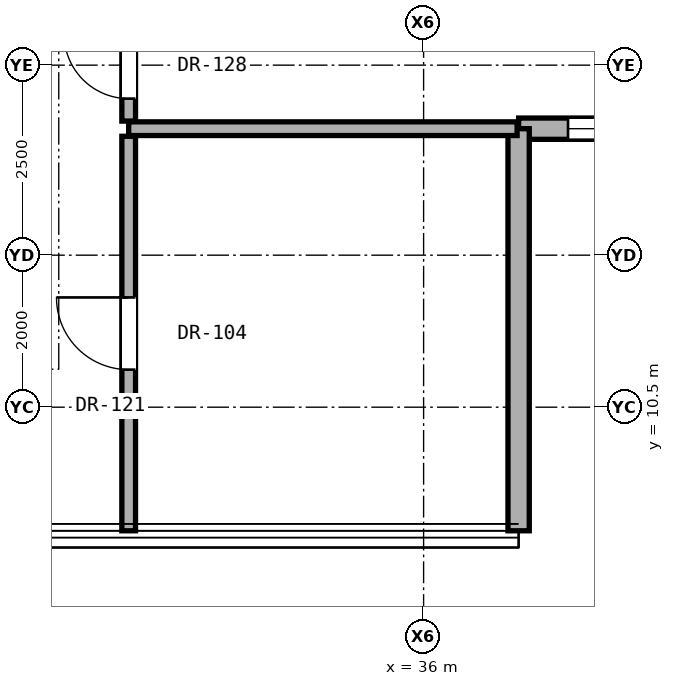
"""IFC4 building model, lengths in metres.
Left out: names, types, materials, properties, quantities, classifications, styles, units other than length and angle.
Written with IfcOpenShell. Run it as: python <this file> out.ifc"""

import sys

from ifc_helpers import new_model, si_unit, direction, frame, frame_2d, origin, place, context, subcontext, project, spatial, rectangle, extrude, element, fill, save


model = new_model("IFC4")
c1 = context("Model", 3, precision=1e-05, world=origin(), true_north=direction((0.0, 1.0)))
c2 = subcontext(c1, "Body", "Model", "MODEL_VIEW")
j1 = project(units=[si_unit("LENGTHUNIT", "METRE"), si_unit("PLANEANGLEUNIT", "RADIAN")], contexts=[c1])
p1 = place(None, origin())
s1 = spatial("IfcSite", under=j1, at=p1, CompositionType="ELEMENT")
p2 = place(p1, origin())
s2 = spatial("IfcBuilding", under=s1, at=p2, CompositionType="ELEMENT")
p3 = place(p2, frame((0.0, 0.0, 242.5)))
s3 = spatial("IfcBuildingStorey", under=s2, at=p3, CompositionType="ELEMENT", Elevation=242.5)
p4 = place(p3, frame((37.25, 14.164, 0.0), z_axis=(0.0, 0.0, 1.0), x_axis=(1.0, 0.0, 0.0)))
e1 = element("IfcWall", 1, at=p4, inside=s3, PredefinedType="SOLIDWALL", context=c2, shape_type="SweptSolid", body=[
    extrude(rectangle(XDim=5.29, YDim=0.28, at=frame_2d((2.645, 0.0))), origin(), (0.0, 0.0, 1.0), 3.08),
])
p5 = place(p4, frame((0.65, 0.0, 0.85)))
e2 = element("IfcOpeningElement", 2, at=p5, cuts=e1, PredefinedType="OPENING", context=c2, shape_type="SweptSolid", body=[
    extrude(rectangle(XDim=1.1, YDim=2.0, at=frame_2d((0.55, 1.0))), frame((0.0, 0.15, 0.0), z_axis=(0.0, -1.0, 0.0), x_axis=(1.0, 0.0, 0.0)), (0.0, 0.0, 1.0), 0.3),
])
p6 = place(p3, frame((37.25, 8.874, 0.0), z_axis=(0.0, 0.0, 1.0), x_axis=(0.0, 1.0, 0.0)))
e3 = element("IfcWall", 3, at=p6, inside=s3, PredefinedType="SOLIDWALL", context=c2, shape_type="SweptSolid", body=[
    extrude(rectangle(XDim=5.29, YDim=0.28, at=frame_2d((2.645, 0.0))), origin(), (0.0, 0.0, 1.0), 3.08),
])
p7 = place(p3, frame((32.12, 14.164, 0.0), z_axis=(0.0, 0.0, 1.0), x_axis=(1.0, 0.0, 0.0)))
e4 = element("IfcWall", 4, at=p7, inside=s3, PredefinedType="PARTITIONING", context=c2, shape_type="SweptSolid", body=[
    extrude(rectangle(XDim=5.11, YDim=0.18, at=frame_2d((2.555, 0.0))), origin(), (0.0, 0.0, 1.0), 3.1),
])
p8 = place(p3, frame((32.12, 8.874, 0.0), z_axis=(0.0, 0.0, 1.0), x_axis=(0.0, 1.0, 0.0)))
e5 = element("IfcWall", 5, at=p8, inside=s3, PredefinedType="PARTITIONING", context=c2, shape_type="SweptSolid", body=[
    extrude(rectangle(XDim=5.19, YDim=0.18, at=frame_2d((2.595, 0.0))), origin(), (0.0, 0.0, 1.0), 3.1),
])
p9 = place(p8, frame((2.12, 0.0, 0.0)))
e6 = element("IfcOpeningElement", 6, at=p9, cuts=e5, PredefinedType="OPENING", context=c2, shape_type="SweptSolid", body=[
    extrude(rectangle(XDim=0.95, YDim=2.15, at=frame_2d((0.475, 1.075))), frame((0.0, 0.1, 0.0), z_axis=(0.0, -1.0, 0.0), x_axis=(1.0, 0.0, 0.0)), (0.0, 0.0, 1.0), 0.2),
])
p10 = place(p3, frame((32.12, 14.264, 0.0), z_axis=(0.0, 0.0, 1.0), x_axis=(0.0, 1.0, 0.0)))
e7 = element("IfcWall", 7, at=p10, inside=s3, PredefinedType="PARTITIONING", context=c2, shape_type="SweptSolid", body=[
    extrude(rectangle(XDim=3.341, YDim=0.18, at=frame_2d((1.67, 0.0))), origin(), (0.0, 0.0, 1.0), 2.543),
])
p11 = place(p10, frame((0.295, 0.0, 0.0)))
e8 = element("IfcOpeningElement", 8, at=p11, cuts=e7, PredefinedType="OPENING", context=c2, shape_type="SweptSolid", body=[
    extrude(rectangle(XDim=0.85, YDim=2.01, at=frame_2d((0.425, 1.005))), frame((0.0, 0.1, 0.0), z_axis=(0.0, -1.0, 0.0), x_axis=(1.0, 0.0, 0.0)), (0.0, 0.0, 1.0), 0.2),
])
p12 = place(p5, origin())
e9 = element("IfcWindow", 9, at=p12, inside=s3, PartitioningType="SINGLE_PANEL", PredefinedType="WINDOW", context=c2, shape_type="SweptSolid", body=[
    extrude(rectangle(XDim=1.1, YDim=2.0, at=frame_2d((0.55, 1.0))), frame((0.0, 0.03, 0.0), z_axis=(0.0, -1.0, 0.0), x_axis=(1.0, 0.0, 0.0)), (0.0, 0.0, 1.0), 0.06),
])
fill(e2, e9)
p13 = place(p11, origin())
e10 = element("IfcDoor", 10, at=p13, inside=s3, OperationType="SINGLE_SWING_RIGHT", PredefinedType="DOOR", context=c2, shape_type="SweptSolid", body=[
    extrude(rectangle(XDim=0.85, YDim=2.01, at=frame_2d((0.425, 1.005))), frame((0.0, 0.025, 0.0), z_axis=(0.0, -1.0, 0.0), x_axis=(1.0, 0.0, 0.0)), (0.0, 0.0, 1.0), 0.05),
])
fill(e8, e10)
p14 = place(p9, origin())
e11 = element("IfcDoor", 11, at=p14, inside=s3, OperationType="SINGLE_SWING_RIGHT", PredefinedType="DOOR", context=c2, shape_type="SweptSolid", body=[
    extrude(rectangle(XDim=0.95, YDim=2.15, at=frame_2d((0.475, 1.075))), frame((0.0, 0.025, 0.0), z_axis=(0.0, -1.0, 0.0), x_axis=(1.0, 0.0, 0.0)), (0.0, 0.0, 1.0), 0.05),
])
fill(e6, e11)
save(model, sys.argv[1])
